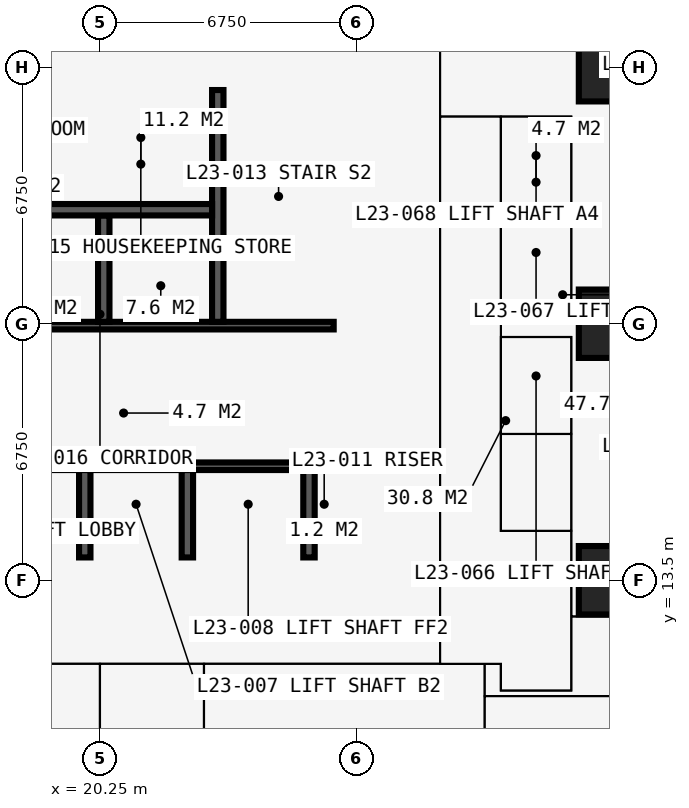
"""IFC4 building model, lengths in metres.
Left out: names, types, materials, properties, quantities, classifications, styles, units other than length and angle.
Written with IfcOpenShell. Run it as: python <this file> out.ifc"""

import sys

from ifc_helpers import new_model, si_unit, direction, frame, frame_2d, origin, origin_2d, place, context, subcontext, project, spatial, rectangle, extrude, element, fill, save


model = new_model("IFC4")
c1 = context("Model", 3, precision=1e-05, world=origin(), true_north=direction((0.0, 1.0)))
c2 = subcontext(c1, "Body", "Model", "MODEL_VIEW")
j1 = project(units=[si_unit("LENGTHUNIT", "METRE"), si_unit("PLANEANGLEUNIT", "RADIAN")], contexts=[c1])
p1 = place(None, origin())
s1 = spatial("IfcSite", under=j1, at=p1, CompositionType="ELEMENT")
p2 = place(p1, origin())
s2 = spatial("IfcBuilding", under=s1, at=p2, CompositionType="ELEMENT")
p3 = place(p2, frame((0.0, 0.0, 87.3)))
s3 = spatial("IfcBuildingStorey", under=s2, at=p3, CompositionType="ELEMENT", Elevation=87.3)
for number, where, z_axis, x_axis in (
    (1, (33.75, 13.5, 0.0), (0.0, 0.0, 1.0), (1.0, 0.0, 0.0)),
    (2, (33.75, 20.25, 0.0), (0.0, 0.0, 1.0), (1.0, 0.0, 0.0)),
    (3, (33.75, 27.0, 0.0), (0.0, 0.0, 1.0), (1.0, 0.0, 0.0)),
):
    element("IfcColumn", number, at=place(p3, frame(where, z_axis=z_axis, x_axis=x_axis)), inside=s3, PredefinedType="COLUMN", context=c2, shape_type="SweptSolid", body=[
        extrude(rectangle(XDim=1.8, YDim=1.8, at=origin_2d()), origin(), (0.0, 0.0, 1.0), 3.6),
    ])
p4 = place(p3, frame((12.9, 13.5, 0.0), z_axis=(0.0, 0.0, 1.0), x_axis=(1.0, 0.0, 0.0)))
e4 = element("IfcWall", 4, at=p4, inside=s3, PredefinedType="SHEAR", context=c2, shape_type="SweptSolid", body=[
    extrude(rectangle(XDim=14.7, YDim=1.2, at=frame_2d((7.35, 0.0))), origin(), (0.0, 0.0, 1.0), 3.6),
])
p5 = place(p3, frame((27.0, 14.1, 0.0), z_axis=(0.0, 0.0, 1.0), x_axis=(0.0, 1.0, 0.0)))
e5 = element("IfcWall", 5, at=p5, inside=s3, PredefinedType="SHEAR", context=c2, shape_type="SweptSolid", body=[
    extrude(rectangle(XDim=12.3, YDim=1.2, at=frame_2d((6.15, 0.0))), origin(), (0.0, 0.0, 1.0), 3.6),
])
p6 = place(p5, frame((3.65, 0.0, 0.0)))
e6 = element("IfcOpeningElement", 6, at=p6, cuts=e5, PredefinedType="OPENING", context=c2, shape_type="SweptSolid", body=[
    extrude(rectangle(XDim=1.2, YDim=2.2, at=frame_2d((0.6, 1.1))), frame((0.0, 0.61, 0.0), z_axis=(0.0, -1.0, 0.0), x_axis=(1.0, 0.0, 0.0)), (0.0, 0.0, 1.0), 1.22),
])
p7 = place(p3, frame((27.6, 27.0, 0.0), z_axis=(0.0, 0.0, 1.0), x_axis=(-1.0, 0.0, 0.0)))
e7 = element("IfcWall", 7, at=p7, inside=s3, PredefinedType="SHEAR", context=c2, shape_type="SweptSolid", body=[
    extrude(rectangle(XDim=14.7, YDim=1.2, at=frame_2d((7.35, 0.0))), origin(), (0.0, 0.0, 1.0), 3.6),
])
p8 = place(p7, frame((5.225, 0.0, 0.0)))
e8 = element("IfcOpeningElement", 8, at=p8, cuts=e7, PredefinedType="OPENING", context=c2, shape_type="SweptSolid", body=[
    extrude(rectangle(XDim=0.9, YDim=2.2, at=frame_2d((0.45, 1.1))), frame((0.0, 0.61, 0.0), z_axis=(0.0, -1.0, 0.0), x_axis=(1.0, 0.0, 0.0)), (0.0, 0.0, 1.0), 1.22),
])
p9 = place(p7, frame((8.2, 0.0, 0.0)))
e9 = element("IfcOpeningElement", 9, at=p9, cuts=e7, PredefinedType="OPENING", context=c2, shape_type="SweptSolid", body=[
    extrude(rectangle(XDim=1.0, YDim=2.2, at=frame_2d((0.5, 1.1))), frame((0.0, 0.61, 0.0), z_axis=(0.0, -1.0, 0.0), x_axis=(1.0, 0.0, 0.0)), (0.0, 0.0, 1.0), 1.22),
])
p10 = place(p3, frame((14.1, 16.5, 0.0), z_axis=(0.0, 0.0, 1.0), x_axis=(1.0, 0.0, 0.0)))
e10 = element("IfcWall", 10, at=p10, inside=s3, PredefinedType="SHEAR", context=c2, shape_type="SweptSolid", body=[
    extrude(rectangle(XDim=12.3, YDim=0.2, at=frame_2d((6.15, 0.0))), origin(), (0.0, 0.0, 1.0), 3.6),
])
p11 = place(p10, frame((0.9, 0.0, 0.0)))
e11 = element("IfcOpeningElement", 11, at=p11, cuts=e10, PredefinedType="OPENING", context=c2, shape_type="SweptSolid", body=[
    extrude(rectangle(XDim=1.1, YDim=2.2, at=frame_2d((0.55, 1.1))), frame((0.0, 0.11, 0.0), z_axis=(0.0, -1.0, 0.0), x_axis=(1.0, 0.0, 0.0)), (0.0, 0.0, 1.0), 0.22),
])
p12 = place(p10, frame((9.5, 0.0, 0.0)))
e12 = element("IfcOpeningElement", 12, at=p12, cuts=e10, PredefinedType="OPENING", context=c2, shape_type="SweptSolid", body=[
    extrude(rectangle(XDim=1.1, YDim=2.2, at=frame_2d((0.55, 1.1))), frame((0.0, 0.11, 0.0), z_axis=(0.0, -1.0, 0.0), x_axis=(1.0, 0.0, 0.0)), (0.0, 0.0, 1.0), 0.22),
])
p13 = place(p3, frame((14.1, 20.2, 0.0), z_axis=(0.0, 0.0, 1.0), x_axis=(1.0, 0.0, 0.0)))
e13 = element("IfcWall", 13, at=p13, inside=s3, PredefinedType="SHEAR", context=c2, shape_type="SweptSolid", body=[
    extrude(rectangle(XDim=12.3, YDim=0.2, at=frame_2d((6.15, 0.0))), origin(), (0.0, 0.0, 1.0), 3.6),
])
p14 = place(p13, frame((0.35, 0.0, 0.0)))
e14 = element("IfcOpeningElement", 14, at=p14, cuts=e13, PredefinedType="OPENING", context=c2, shape_type="SweptSolid", body=[
    extrude(rectangle(XDim=1.1, YDim=2.2, at=frame_2d((0.55, 1.1))), frame((0.0, 0.11, 0.0), z_axis=(0.0, -1.0, 0.0), x_axis=(1.0, 0.0, 0.0)), (0.0, 0.0, 1.0), 0.22),
])
p15 = place(p13, frame((9.75, 0.0, 0.0)))
e15 = element("IfcOpeningElement", 15, at=p15, cuts=e13, PredefinedType="OPENING", context=c2, shape_type="SweptSolid", body=[
    extrude(rectangle(XDim=1.1, YDim=2.2, at=frame_2d((0.55, 1.1))), frame((0.0, 0.11, 0.0), z_axis=(0.0, -1.0, 0.0), x_axis=(1.0, 0.0, 0.0)), (0.0, 0.0, 1.0), 0.22),
])
p16 = place(p3, frame((23.35, 20.3, 0.0), z_axis=(0.0, 0.0, 1.0), x_axis=(0.0, 1.0, 0.0)))
e16 = element("IfcWall", 16, at=p16, inside=s3, PredefinedType="SHEAR", context=c2, shape_type="SweptSolid", body=[
    extrude(rectangle(XDim=6.1, YDim=0.3, at=frame_2d((3.05, 0.0))), origin(), (0.0, 0.0, 1.0), 3.6),
])
p17 = place(p3, frame((20.35, 20.3, 0.0), z_axis=(0.0, 0.0, 1.0), x_axis=(0.0, 1.0, 0.0)))
e17 = element("IfcWall", 17, at=p17, inside=s3, PredefinedType="SHEAR", context=c2, shape_type="SweptSolid", body=[
    extrude(rectangle(XDim=2.8, YDim=0.3, at=frame_2d((1.4, 0.0))), origin(), (0.0, 0.0, 1.0), 3.6),
])
p18 = place(p3, frame((17.3, 23.25, 0.0), z_axis=(0.0, 0.0, 1.0), x_axis=(1.0, 0.0, 0.0)))
e18 = element("IfcWall", 18, at=p18, inside=s3, PredefinedType="SHEAR", context=c2, shape_type="SweptSolid", body=[
    extrude(rectangle(XDim=5.9, YDim=0.3, at=frame_2d((2.95, 0.0))), origin(), (0.0, 0.0, 1.0), 3.6),
])
for number, where, z_axis, x_axis in (
    (19, (19.85, 14.1, 0.0), (0.0, 0.0, 1.0), (0.0, 1.0, 0.0)),
    (20, (22.55, 14.1, 0.0), (0.0, 0.0, 1.0), (0.0, 1.0, 0.0)),
    (21, (25.75, 14.1, 0.0), (0.0, 0.0, 1.0), (0.0, 1.0, 0.0)),
):
    element("IfcWall", number, at=place(p3, frame(where, z_axis=z_axis, x_axis=x_axis)), inside=s3, PredefinedType="SHEAR", context=c2, shape_type="SweptSolid", body=[
        extrude(rectangle(XDim=2.3, YDim=0.3, at=frame_2d((1.15, 0.0))), origin(), (0.0, 0.0, 1.0), 3.6),
    ])
p19 = place(p3, frame((21.625, 16.6, 0.0), z_axis=(0.0, 0.0, 1.0), x_axis=(0.0, 1.0, 0.0)))
e22 = element("IfcWall", 22, at=p19, inside=s3, PredefinedType="PARTITIONING", context=c2, shape_type="SweptSolid", body=[
    extrude(rectangle(XDim=3.5, YDim=0.15, at=frame_2d((1.75, 0.0))), origin(), (0.0, 0.0, 1.0), 3.375),
])
p20 = place(p19, frame((1.15, 0.0, 0.0)))
e23 = element("IfcOpeningElement", 23, at=p20, cuts=e22, PredefinedType="OPENING", context=c2, shape_type="SweptSolid", body=[
    extrude(rectangle(XDim=1.2, YDim=2.2, at=frame_2d((0.6, 1.1))), frame((0.0, 0.085, 0.0), z_axis=(0.0, -1.0, 0.0), x_axis=(1.0, 0.0, 0.0)), (0.0, 0.0, 1.0), 0.17),
])
p21 = place(p3, frame((20.12, 16.6, 0.0), z_axis=(0.0, 0.0, 1.0), x_axis=(0.0, 1.0, 0.0)))
e24 = element("IfcWall", 24, at=p21, inside=s3, PredefinedType="PARTITIONING", context=c2, shape_type="SweptSolid", body=[
    extrude(rectangle(XDim=3.5, YDim=0.15, at=frame_2d((1.75, 0.0))), origin(), (0.0, 0.0, 1.0), 3.375),
])
p22 = place(p3, frame((19.375, 23.4, 0.0), z_axis=(0.0, 0.0, 1.0), x_axis=(0.0, 1.0, 0.0)))
e25 = element("IfcWall", 25, at=p22, inside=s3, PredefinedType="PARTITIONING", context=c2, shape_type="SweptSolid", body=[
    extrude(rectangle(XDim=3.0, YDim=0.15, at=frame_2d((1.5, 0.0))), origin(), (0.0, 0.0, 1.0), 3.375),
])
p23 = place(p3, frame((10.125, 11.3, 0.0), z_axis=(0.0, 0.0, 1.0), x_axis=(1.0, 0.0, 0.0)))
e26 = element("IfcWall", 26, at=p23, inside=s3, PredefinedType="PARTITIONING", context=c2, shape_type="SweptSolid", body=[
    extrude(rectangle(XDim=20.675, YDim=0.15, at=frame_2d((10.337, 0.0))), origin(), (0.0, 0.0, 1.0), 3.375),
])
p24 = place(p23, frame((8.375, 0.0, 0.0)))
e27 = element("IfcOpeningElement", 27, at=p24, cuts=e26, PredefinedType="OPENING", context=c2, shape_type="SweptSolid", body=[
    extrude(rectangle(XDim=1.0, YDim=2.2, at=frame_2d((0.5, 1.1))), frame((0.0, 0.085, 0.0), z_axis=(0.0, -1.0, 0.0), x_axis=(1.0, 0.0, 0.0)), (0.0, 0.0, 1.0), 0.17),
])
p25 = place(p23, frame((10.975, 0.0, 0.0)))
e28 = element("IfcOpeningElement", 28, at=p25, cuts=e26, PredefinedType="OPENING", context=c2, shape_type="SweptSolid", body=[
    extrude(rectangle(XDim=1.0, YDim=2.2, at=frame_2d((0.5, 1.1))), frame((0.0, 0.085, 0.0), z_axis=(0.0, -1.0, 0.0), x_axis=(1.0, 0.0, 0.0)), (0.0, 0.0, 1.0), 0.17),
])
p26 = place(p23, frame((3.925, 0.0, 0.0)))
e29 = element("IfcOpeningElement", 29, at=p26, cuts=e26, PredefinedType="OPENING", context=c2, shape_type="SweptSolid", body=[
    extrude(rectangle(XDim=0.95, YDim=2.2, at=frame_2d((0.475, 1.1))), frame((0.0, 0.085, 0.0), z_axis=(0.0, -1.0, 0.0), x_axis=(1.0, 0.0, 0.0)), (0.0, 0.0, 1.0), 0.17),
])
p27 = place(p3, frame((20.25, -0.734, 0.0), z_axis=(0.0, 0.0, 1.0), x_axis=(0.0, 1.0, 0.0)))
e30 = element("IfcWall", 30, at=p27, inside=s3, PredefinedType="PARTITIONING", context=c2, shape_type="SweptSolid", body=[
    extrude(rectangle(XDim=12.034, YDim=0.15, at=frame_2d((6.017, 0.0))), origin(), (0.0, 0.0, 1.0), 2.61),
])
p28 = place(p3, frame((22.988, 4.85, 0.0), z_axis=(0.0, 0.0, 1.0), x_axis=(0.0, 1.0, 0.0)))
e31 = element("IfcWall", 31, at=p28, inside=s3, PredefinedType="PARTITIONING", context=c2, shape_type="SweptSolid", body=[
    extrude(rectangle(XDim=6.45, YDim=0.15, at=frame_2d((3.225, 0.0))), origin(), (0.0, 0.0, 1.0), 3.375),
])
p29 = place(p28, frame((2.75, 0.0, 0.0)))
e32 = element("IfcOpeningElement", 32, at=p29, cuts=e31, PredefinedType="OPENING", context=c2, shape_type="SweptSolid", body=[
    extrude(rectangle(XDim=0.95, YDim=2.2, at=frame_2d((0.475, 1.1))), frame((0.0, 0.085, 0.0), z_axis=(0.0, -1.0, 0.0), x_axis=(1.0, 0.0, 0.0)), (0.0, 0.0, 1.0), 0.17),
])
p30 = place(p3, frame((29.2, 11.3, 0.0), z_axis=(0.0, 0.0, 1.0), x_axis=(0.0, 1.0, 0.0)))
e33 = element("IfcWall", 33, at=p30, inside=s3, PredefinedType="PARTITIONING", context=c2, shape_type="SweptSolid", body=[
    extrude(rectangle(XDim=17.9, YDim=0.2, at=frame_2d((8.95, 0.0))), origin(), (0.0, 0.0, 1.0), 3.375),
])
p31 = place(p30, frame((8.35, 0.0, 0.0)))
e34 = element("IfcOpeningElement", 34, at=p31, cuts=e33, PredefinedType="OPENING", context=c2, shape_type="SweptSolid", body=[
    extrude(rectangle(XDim=1.2, YDim=2.2, at=frame_2d((0.6, 1.1))), frame((0.0, 0.11, 0.0), z_axis=(0.0, -1.0, 0.0), x_axis=(1.0, 0.0, 0.0)), (0.0, 0.0, 1.0), 0.22),
])
p32 = place(p3, frame((29.2, 25.7, 0.0), z_axis=(0.0, 0.0, 1.0), x_axis=(1.0, 0.0, 0.0)))
e35 = element("IfcWall", 35, at=p32, inside=s3, PredefinedType="SHEAR", context=c2, shape_type="SweptSolid", body=[
    extrude(rectangle(XDim=3.45, YDim=0.1, at=frame_2d((1.725, 0.0))), origin(), (0.0, 0.0, 1.0), 3.375),
])
p33 = place(p3, frame((30.375, -0.734, 0.0), z_axis=(0.0, 0.0, 1.0), x_axis=(0.0, 1.0, 0.0)))
e36 = element("IfcWall", 36, at=p33, inside=s3, PredefinedType="PARTITIONING", context=c2, shape_type="SweptSolid", body=[
    extrude(rectangle(XDim=12.034, YDim=0.15, at=frame_2d((6.017, 0.0))), origin(), (0.0, 0.0, 1.0), 3.375),
])
p34 = place(p33, frame((4.884, 0.0, 0.0)))
e37 = element("IfcOpeningElement", 37, at=p34, cuts=e36, PredefinedType="OPENING", context=c2, shape_type="SweptSolid", body=[
    extrude(rectangle(XDim=1.0, YDim=2.2, at=frame_2d((0.5, 1.1))), frame((0.0, 0.085, 0.0), z_axis=(0.0, -1.0, 0.0), x_axis=(1.0, 0.0, 0.0)), (0.0, 0.0, 1.0), 0.17),
])
p35 = place(p3, frame((30.375, 10.45, 0.0), z_axis=(0.0, 0.0, 1.0), x_axis=(1.0, 0.0, 0.0)))
e38 = element("IfcWall", 38, at=p35, inside=s3, PredefinedType="PARTITIONING", context=c2, shape_type="SweptSolid", body=[
    extrude(rectangle(XDim=5.275, YDim=0.15, at=frame_2d((2.637, 0.0))), origin(), (0.0, 0.0, 1.0), 3.375),
])
p36 = place(p35, frame((2.35, 0.0, 0.0)))
e39 = element("IfcOpeningElement", 39, at=p36, cuts=e38, PredefinedType="OPENING", context=c2, shape_type="SweptSolid", body=[
    extrude(rectangle(XDim=0.95, YDim=2.2, at=frame_2d((0.475, 1.1))), frame((0.0, 0.085, 0.0), z_axis=(0.0, -1.0, 0.0), x_axis=(1.0, 0.0, 0.0)), (0.0, 0.0, 1.0), 0.17),
])
p37 = place(p3, frame((30.8, 10.6, 0.0), z_axis=(0.0, 0.0, 1.0), x_axis=(0.0, 1.0, 0.0)))
e40 = element("IfcWall", 40, at=p37, inside=s3, PredefinedType="PARTITIONING", context=c2, shape_type="SweptSolid", body=[
    extrude(rectangle(XDim=0.7, YDim=0.15, at=frame_2d((0.35, 0.0))), origin(), (0.0, 0.0, 1.0), 3.375),
])
p38 = place(p3, frame((30.8, 10.6, 0.0), z_axis=(0.0, 0.0, 1.0), x_axis=(1.0, 0.0, 0.0)))
e41 = element("IfcWall", 41, at=p38, inside=s3, PredefinedType="PARTITIONING", context=c2, shape_type="SweptSolid", body=[
    extrude(rectangle(XDim=1.85, YDim=0.15, at=frame_2d((0.925, 0.0))), origin(), (0.0, 0.0, 1.0), 3.375),
])
p39 = place(p3, frame((30.8, 14.8, 0.0), z_axis=(0.0, 0.0, 1.0), x_axis=(0.0, 1.0, 0.0)))
e42 = element("IfcWall", 42, at=p39, inside=s3, PredefinedType="PARTITIONING", context=c2, shape_type="SweptSolid", body=[
    extrude(rectangle(XDim=10.9, YDim=0.15, at=frame_2d((5.45, 0.0))), origin(), (0.0, 0.0, 1.0), 3.375),
])
p40 = place(p39, frame((0.75, 0.0, 0.0)))
e43 = element("IfcOpeningElement", 43, at=p40, cuts=e42, PredefinedType="OPENING", context=c2, shape_type="SweptSolid", body=[
    extrude(rectangle(XDim=1.1, YDim=2.2, at=frame_2d((0.55, 1.1))), frame((0.0, 0.085, 0.0), z_axis=(0.0, -1.0, 0.0), x_axis=(1.0, 0.0, 0.0)), (0.0, 0.0, 1.0), 0.17),
])
p41 = place(p39, frame((3.25, 0.0, 0.0)))
e44 = element("IfcOpeningElement", 44, at=p41, cuts=e42, PredefinedType="OPENING", context=c2, shape_type="SweptSolid", body=[
    extrude(rectangle(XDim=1.1, YDim=2.2, at=frame_2d((0.55, 1.1))), frame((0.0, 0.085, 0.0), z_axis=(0.0, -1.0, 0.0), x_axis=(1.0, 0.0, 0.0)), (0.0, 0.0, 1.0), 0.17),
])
p42 = place(p39, frame((6.5, 0.0, 0.0)))
e45 = element("IfcOpeningElement", 45, at=p42, cuts=e42, PredefinedType="OPENING", context=c2, shape_type="SweptSolid", body=[
    extrude(rectangle(XDim=1.1, YDim=2.2, at=frame_2d((0.55, 1.1))), frame((0.0, 0.085, 0.0), z_axis=(0.0, -1.0, 0.0), x_axis=(1.0, 0.0, 0.0)), (0.0, 0.0, 1.0), 0.17),
])
p43 = place(p39, frame((9.05, 0.0, 0.0)))
e46 = element("IfcOpeningElement", 46, at=p43, cuts=e42, PredefinedType="OPENING", context=c2, shape_type="SweptSolid", body=[
    extrude(rectangle(XDim=1.1, YDim=2.2, at=frame_2d((0.55, 1.1))), frame((0.0, 0.085, 0.0), z_axis=(0.0, -1.0, 0.0), x_axis=(1.0, 0.0, 0.0)), (0.0, 0.0, 1.0), 0.17),
])
for number, where, z_axis, x_axis in (
    (47, (30.8, 14.8, 0.0), (0.0, 0.0, 1.0), (1.0, 0.0, 0.0)),
    (48, (30.8, 17.35, 0.0), (0.0, 0.0, 1.0), (1.0, 0.0, 0.0)),
    (49, (30.8, 19.9, 0.0), (0.0, 0.0, 1.0), (1.0, 0.0, 0.0)),
    (50, (30.8, 20.6, 0.0), (0.0, 0.0, 1.0), (1.0, 0.0, 0.0)),
    (51, (30.8, 23.15, 0.0), (0.0, 0.0, 1.0), (1.0, 0.0, 0.0)),
):
    element("IfcWall", number, at=place(p3, frame(where, z_axis=z_axis, x_axis=x_axis)), inside=s3, PredefinedType="SHEAR", context=c2, shape_type="SweptSolid", body=[
        extrude(rectangle(XDim=1.85, YDim=0.1, at=frame_2d((0.925, 0.0))), origin(), (0.0, 0.0, 1.0), 3.375),
    ])
p44 = place(p3, frame((32.65, 10.6, 0.0), z_axis=(0.0, 0.0, 1.0), x_axis=(0.0, 1.0, 0.0)))
e52 = element("IfcWall", 52, at=p44, inside=s3, PredefinedType="SHEAR", context=c2, shape_type="SweptSolid", body=[
    extrude(rectangle(XDim=9.3, YDim=0.1, at=frame_2d((4.65, 0.0))), origin(), (0.0, 0.0, 1.0), 3.375),
])
p45 = place(p44, frame((0.5, 0.0, 0.0)))
e53 = element("IfcOpeningElement", 53, at=p45, cuts=e52, PredefinedType="OPENING", context=c2, shape_type="SweptSolid", body=[
    extrude(rectangle(XDim=1.0, YDim=2.2, at=frame_2d((0.5, 1.1))), frame((0.0, 0.06, 0.0), z_axis=(0.0, -1.0, 0.0), x_axis=(1.0, 0.0, 0.0)), (0.0, 0.0, 1.0), 0.12),
])
p46 = place(p3, frame((32.65, 12.55, 0.0), z_axis=(0.0, 0.0, 1.0), x_axis=(1.0, 0.0, 0.0)))
e54 = element("IfcWall", 54, at=p46, inside=s3, PredefinedType="PARTITIONING", context=c2, shape_type="SweptSolid", body=[
    extrude(rectangle(XDim=3.0, YDim=0.15, at=frame_2d((1.5, 0.0))), origin(), (0.0, 0.0, 1.0), 3.375),
])
p47 = place(p3, frame((32.65, 20.6, 0.0), z_axis=(0.0, 0.0, 1.0), x_axis=(0.0, 1.0, 0.0)))
e55 = element("IfcWall", 55, at=p47, inside=s3, PredefinedType="PARTITIONING", context=c2, shape_type="SweptSolid", body=[
    extrude(rectangle(XDim=5.1, YDim=0.15, at=frame_2d((2.55, 0.0))), origin(), (0.0, 0.0, 1.0), 3.375),
])
p48 = place(p12, origin())
e56 = element("IfcDoor", 56, at=p48, inside=s3, OperationType="DOUBLE_DOOR_SLIDING", PredefinedType="DOOR", context=c2, shape_type="SweptSolid", body=[
    extrude(rectangle(XDim=1.1, YDim=2.2, at=frame_2d((0.55, 1.1))), frame((0.0, 0.025, 0.0), z_axis=(0.0, -1.0, 0.0), x_axis=(1.0, 0.0, 0.0)), (0.0, 0.0, 1.0), 0.05),
])
fill(e12, e56)
p49 = place(p6, origin())
e57 = element("IfcDoor", 57, at=p49, inside=s3, OperationType="DOUBLE_DOOR_SINGLE_SWING", PredefinedType="DOOR", context=c2, shape_type="SweptSolid", body=[
    extrude(rectangle(XDim=1.2, YDim=2.2, at=frame_2d((0.6, 1.1))), frame((0.0, 0.025, 0.0), z_axis=(0.0, -1.0, 0.0), x_axis=(1.0, 0.0, 0.0)), (0.0, 0.0, 1.0), 0.05),
])
fill(e6, e57)
p50 = place(p20, origin())
e58 = element("IfcDoor", 58, at=p50, inside=s3, OperationType="DOUBLE_DOOR_SINGLE_SWING", PredefinedType="DOOR", context=c2, shape_type="SweptSolid", body=[
    extrude(rectangle(XDim=1.2, YDim=2.2, at=frame_2d((0.6, 1.1))), frame((0.0, 0.025, 0.0), z_axis=(0.0, -1.0, 0.0), x_axis=(1.0, 0.0, 0.0)), (0.0, 0.0, 1.0), 0.05),
])
fill(e23, e58)
p51 = place(p8, origin())
e59 = element("IfcDoor", 59, at=p51, inside=s3, OperationType="SINGLE_SWING_LEFT", PredefinedType="DOOR", context=c2, shape_type="SweptSolid", body=[
    extrude(rectangle(XDim=0.9, YDim=2.2, at=frame_2d((0.45, 1.1))), frame((0.0, 0.4, 0.0), z_axis=(0.0, -1.0, 0.0), x_axis=(1.0, 0.0, 0.0)), (0.0, 0.0, 1.0), 0.8),
])
fill(e8, e59)
p52 = place(p9, origin())
e60 = element("IfcDoor", 60, at=p52, inside=s3, OperationType="SINGLE_SWING_LEFT", PredefinedType="DOOR", context=c2, shape_type="SweptSolid", body=[
    extrude(rectangle(XDim=1.0, YDim=2.2, at=frame_2d((0.5, 1.1))), frame((0.0, 0.025, 0.0), z_axis=(0.0, -1.0, 0.0), x_axis=(1.0, 0.0, 0.0)), (0.0, 0.0, 1.0), 0.05),
])
fill(e9, e60)
p53 = place(p15, origin())
e61 = element("IfcDoor", 61, at=p53, inside=s3, OperationType="SINGLE_SWING_LEFT", PredefinedType="DOOR", context=c2, shape_type="SweptSolid", body=[
    extrude(rectangle(XDim=1.1, YDim=2.2, at=frame_2d((0.55, 1.1))), frame((0.0, 0.025, 0.0), z_axis=(0.0, -1.0, 0.0), x_axis=(1.0, 0.0, 0.0)), (0.0, 0.0, 1.0), 0.05),
])
fill(e15, e61)
p54 = place(p24, origin())
e62 = element("IfcDoor", 62, at=p54, inside=s3, OperationType="SINGLE_SWING_LEFT", PredefinedType="DOOR", context=c2, shape_type="SweptSolid", body=[
    extrude(rectangle(XDim=1.0, YDim=2.2, at=frame_2d((0.5, 1.1))), frame((0.0, 0.025, 0.0), z_axis=(0.0, -1.0, 0.0), x_axis=(1.0, 0.0, 0.0)), (0.0, 0.0, 1.0), 0.05),
])
fill(e27, e62)
p55 = place(p25, origin())
e63 = element("IfcDoor", 63, at=p55, inside=s3, OperationType="SINGLE_SWING_LEFT", PredefinedType="DOOR", context=c2, shape_type="SweptSolid", body=[
    extrude(rectangle(XDim=1.0, YDim=2.2, at=frame_2d((0.5, 1.1))), frame((0.0, 0.025, 0.0), z_axis=(0.0, -1.0, 0.0), x_axis=(1.0, 0.0, 0.0)), (0.0, 0.0, 1.0), 0.05),
])
fill(e28, e63)
p56 = place(p45, origin())
e64 = element("IfcDoor", 64, at=p56, inside=s3, OperationType="SINGLE_SWING_LEFT", PredefinedType="DOOR", context=c2, shape_type="SweptSolid", body=[
    extrude(rectangle(XDim=1.0, YDim=2.2, at=frame_2d((0.5, 1.1))), frame((0.0, 0.025, 0.0), z_axis=(0.0, -1.0, 0.0), x_axis=(1.0, 0.0, 0.0)), (0.0, 0.0, 1.0), 0.05),
])
fill(e53, e64)
p57 = place(p36, origin())
e65 = element("IfcDoor", 65, at=p57, inside=s3, OperationType="SINGLE_SWING_LEFT", PredefinedType="DOOR", context=c2, shape_type="SweptSolid", body=[
    extrude(rectangle(XDim=0.95, YDim=2.2, at=frame_2d((0.475, 1.1))), frame((0.0, 0.025, 0.0), z_axis=(0.0, -1.0, 0.0), x_axis=(1.0, 0.0, 0.0)), (0.0, 0.0, 1.0), 0.05),
])
fill(e39, e65)
p58 = place(p40, origin())
e66 = element("IfcDoor", 66, at=p58, inside=s3, OperationType="DOUBLE_DOOR_SLIDING", PredefinedType="DOOR", context=c2, shape_type="SweptSolid", body=[
    extrude(rectangle(XDim=1.1, YDim=2.2, at=frame_2d((0.55, 1.1))), frame((0.0, 0.025, 0.0), z_axis=(0.0, -1.0, 0.0), x_axis=(1.0, 0.0, 0.0)), (0.0, 0.0, 1.0), 0.05),
])
fill(e43, e66)
p59 = place(p41, origin())
e67 = element("IfcDoor", 67, at=p59, inside=s3, OperationType="DOUBLE_DOOR_SLIDING", PredefinedType="DOOR", context=c2, shape_type="SweptSolid", body=[
    extrude(rectangle(XDim=1.1, YDim=2.2, at=frame_2d((0.55, 1.1))), frame((0.0, 0.025, 0.0), z_axis=(0.0, -1.0, 0.0), x_axis=(1.0, 0.0, 0.0)), (0.0, 0.0, 1.0), 0.05),
])
fill(e44, e67)
p60 = place(p42, origin())
e68 = element("IfcDoor", 68, at=p60, inside=s3, OperationType="DOUBLE_DOOR_SLIDING", PredefinedType="DOOR", context=c2, shape_type="SweptSolid", body=[
    extrude(rectangle(XDim=1.1, YDim=2.2, at=frame_2d((0.55, 1.1))), frame((0.0, 0.025, 0.0), z_axis=(0.0, -1.0, 0.0), x_axis=(1.0, 0.0, 0.0)), (0.0, 0.0, 1.0), 0.05),
])
fill(e45, e68)
p61 = place(p43, origin())
e69 = element("IfcDoor", 69, at=p61, inside=s3, OperationType="DOUBLE_DOOR_SLIDING", PredefinedType="DOOR", context=c2, shape_type="SweptSolid", body=[
    extrude(rectangle(XDim=1.1, YDim=2.2, at=frame_2d((0.55, 1.1))), frame((0.0, 0.025, 0.0), z_axis=(0.0, -1.0, 0.0), x_axis=(1.0, 0.0, 0.0)), (0.0, 0.0, 1.0), 0.05),
])
fill(e46, e69)
p62 = place(p31, origin())
e70 = element("IfcDoor", 70, at=p62, inside=s3, OperationType="DOUBLE_DOOR_SINGLE_SWING", PredefinedType="DOOR", context=c2, shape_type="SweptSolid", body=[
    extrude(rectangle(XDim=1.2, YDim=2.2, at=frame_2d((0.6, 1.1))), frame((0.0, 0.025, 0.0), z_axis=(0.0, -1.0, 0.0), x_axis=(1.0, 0.0, 0.0)), (0.0, 0.0, 1.0), 0.05),
])
fill(e34, e70)
save(model, sys.argv[1])
